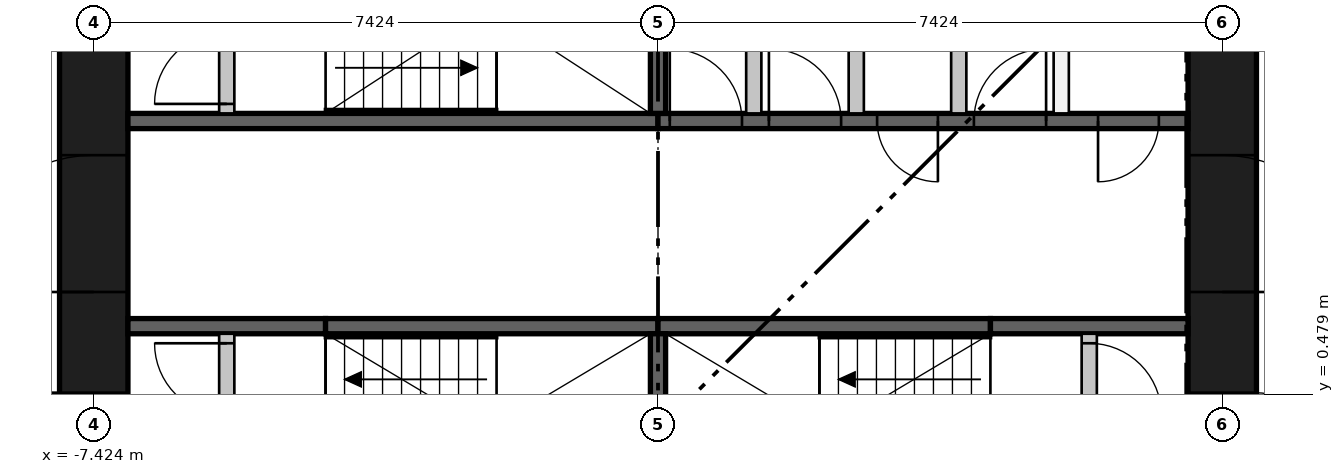
"""IFC4 building model, lengths in metres.
Left out: names, types, materials, properties, quantities, classifications, styles, units other than length and angle.
Written with IfcOpenShell. Run it as: python <this file> out.ifc"""

import sys

from ifc_helpers import new_model, si_unit, direction, frame, frame_2d, origin, place, context, subcontext, project, spatial, rectangle, extrude, element, fill, save


model = new_model("IFC4")
c1 = context("Model", 3, precision=1e-05, world=origin(), true_north=direction((0.0, 1.0)))
c2 = subcontext(c1, "Body", "Model", "MODEL_VIEW")
j1 = project(units=[si_unit("LENGTHUNIT", "METRE"), si_unit("PLANEANGLEUNIT", "RADIAN")], contexts=[c1])
p1 = place(None, origin())
s1 = spatial("IfcSite", under=j1, at=p1, CompositionType="ELEMENT")
p2 = place(p1, origin())
s2 = spatial("IfcBuilding", under=s1, at=p2, CompositionType="ELEMENT")
p3 = place(p2, frame((0.0, 0.0, 51.75)))
s3 = spatial("IfcBuildingStorey", under=s2, at=p3, CompositionType="ELEMENT", Elevation=51.75)
p4 = place(p3, frame((-7.424, -6.974, 0.0), z_axis=(0.0, 0.0, 1.0), x_axis=(0.0, 1.0, 0.0)))
e1 = element("IfcWall", 1, at=p4, inside=s3, PredefinedType="SHEAR", context=c2, shape_type="SweptSolid", body=[
    extrude(rectangle(XDim=13.948, YDim=0.9, at=frame_2d((6.974, 0.0))), origin(), (0.0, 0.0, 1.0), 3.65),
])
p5 = place(p4, frame((6.474, 0.0, 0.0)))
e2 = element("IfcOpeningElement", 2, at=p5, cuts=e1, PredefinedType="OPENING", context=c2, shape_type="SweptSolid", body=[
    extrude(rectangle(XDim=1.0, YDim=2.1, at=frame_2d((0.5, 1.05))), frame((0.0, 0.46, 0.0), z_axis=(0.0, -1.0, 0.0), x_axis=(1.0, 0.0, 0.0)), (0.0, 0.0, 1.0), 0.92),
])
p6 = place(p4, frame((3.35, 0.0, 0.0)))
e3 = element("IfcOpeningElement", 3, at=p6, cuts=e1, PredefinedType="OPENING", context=c2, shape_type="SweptSolid", body=[
    extrude(rectangle(XDim=1.8, YDim=2.1, at=frame_2d((0.9, 1.05))), frame((0.0, 0.46, 0.0), z_axis=(0.0, -1.0, 0.0), x_axis=(1.0, 0.0, 0.0)), (0.0, 0.0, 1.0), 0.92),
])
p7 = place(p4, frame((8.799, 0.0, 0.0)))
e4 = element("IfcOpeningElement", 4, at=p7, cuts=e1, PredefinedType="OPENING", context=c2, shape_type="SweptSolid", body=[
    extrude(rectangle(XDim=1.8, YDim=2.1, at=frame_2d((0.9, 1.05))), frame((0.0, 0.46, 0.0), z_axis=(0.0, -1.0, 0.0), x_axis=(1.0, 0.0, 0.0)), (0.0, 0.0, 1.0), 0.92),
])
p8 = place(p4, frame((11.974, 0.0, 0.0)))
e5 = element("IfcOpeningElement", 5, at=p8, cuts=e1, PredefinedType="OPENING", context=c2, shape_type="SweptSolid", body=[
    extrude(rectangle(XDim=1.0, YDim=2.1, at=frame_2d((0.5, 1.05))), frame((0.0, 0.46, 0.0), z_axis=(0.0, -1.0, 0.0), x_axis=(1.0, 0.0, 0.0)), (0.0, 0.0, 1.0), 0.92),
])
p9 = place(p3, frame((7.424, -6.974, 0.0), z_axis=(0.0, 0.0, 1.0), x_axis=(0.0, 1.0, 0.0)))
e6 = element("IfcWall", 6, at=p9, inside=s3, PredefinedType="SHEAR", context=c2, shape_type="SweptSolid", body=[
    extrude(rectangle(XDim=13.948, YDim=0.9, at=frame_2d((6.974, 0.0))), origin(), (0.0, 0.0, 1.0), 3.65),
])
p10 = place(p9, frame((6.474, 0.0, 0.0)))
e7 = element("IfcOpeningElement", 7, at=p10, cuts=e6, PredefinedType="OPENING", context=c2, shape_type="SweptSolid", body=[
    extrude(rectangle(XDim=1.0, YDim=2.1, at=frame_2d((0.5, 1.05))), frame((0.0, 0.46, 0.0), z_axis=(0.0, -1.0, 0.0), x_axis=(1.0, 0.0, 0.0)), (0.0, 0.0, 1.0), 0.92),
])
p11 = place(p9, frame((3.35, 0.0, 0.0)))
e8 = element("IfcOpeningElement", 8, at=p11, cuts=e6, PredefinedType="OPENING", context=c2, shape_type="SweptSolid", body=[
    extrude(rectangle(XDim=1.8, YDim=2.1, at=frame_2d((0.9, 1.05))), frame((0.0, 0.46, 0.0), z_axis=(0.0, -1.0, 0.0), x_axis=(1.0, 0.0, 0.0)), (0.0, 0.0, 1.0), 0.92),
])
p12 = place(p9, frame((8.799, 0.0, 0.0)))
e9 = element("IfcOpeningElement", 9, at=p12, cuts=e6, PredefinedType="OPENING", context=c2, shape_type="SweptSolid", body=[
    extrude(rectangle(XDim=1.8, YDim=2.1, at=frame_2d((0.9, 1.05))), frame((0.0, 0.46, 0.0), z_axis=(0.0, -1.0, 0.0), x_axis=(1.0, 0.0, 0.0)), (0.0, 0.0, 1.0), 0.92),
])
p13 = place(p3, frame((-6.974, 4.074, 0.0), z_axis=(0.0, 0.0, 1.0), x_axis=(1.0, 0.0, 0.0)))
e10 = element("IfcWall", 10, at=p13, inside=s3, PredefinedType="SHEAR", context=c2, shape_type="SweptSolid", body=[
    extrude(rectangle(XDim=6.974, YDim=0.2, at=frame_2d((3.487, 0.0))), origin(), (0.0, 0.0, 1.0), 3.3),
])
p14 = place(p3, frame((0.0, 4.074, 0.0), z_axis=(0.0, 0.0, 1.0), x_axis=(1.0, 0.0, 0.0)))
e11 = element("IfcWall", 11, at=p14, inside=s3, PredefinedType="SHEAR", context=c2, shape_type="SweptSolid", body=[
    extrude(rectangle(XDim=6.974, YDim=0.2, at=frame_2d((3.487, 0.0))), origin(), (0.0, 0.0, 1.0), 3.3),
])
p15 = place(p14, frame((0.155, 0.0, 0.0)))
e12 = element("IfcOpeningElement", 12, at=p15, cuts=e11, PredefinedType="OPENING", context=c2, shape_type="SweptSolid", body=[
    extrude(rectangle(XDim=0.95, YDim=2.1, at=frame_2d((0.475, 1.05))), frame((0.0, 0.11, 0.0), z_axis=(0.0, -1.0, 0.0), x_axis=(1.0, 0.0, 0.0)), (0.0, 0.0, 1.0), 0.22),
])
p16 = place(p14, frame((1.459, 0.0, 0.0)))
e13 = element("IfcOpeningElement", 13, at=p16, cuts=e11, PredefinedType="OPENING", context=c2, shape_type="SweptSolid", body=[
    extrude(rectangle(XDim=0.95, YDim=2.1, at=frame_2d((0.475, 1.05))), frame((0.0, 0.11, 0.0), z_axis=(0.0, -1.0, 0.0), x_axis=(1.0, 0.0, 0.0)), (0.0, 0.0, 1.0), 0.22),
])
p17 = place(p14, frame((2.883, 0.0, 0.0)))
e14 = element("IfcOpeningElement", 14, at=p17, cuts=e11, PredefinedType="OPENING", context=c2, shape_type="SweptSolid", body=[
    extrude(rectangle(XDim=0.8, YDim=2.1, at=frame_2d((0.4, 1.05))), frame((0.0, 0.11, 0.0), z_axis=(0.0, -1.0, 0.0), x_axis=(1.0, 0.0, 0.0)), (0.0, 0.0, 1.0), 0.22),
])
p18 = place(p14, frame((4.156, 0.0, 0.0)))
e15 = element("IfcOpeningElement", 15, at=p18, cuts=e11, PredefinedType="OPENING", context=c2, shape_type="SweptSolid", body=[
    extrude(rectangle(XDim=0.95, YDim=2.1, at=frame_2d((0.475, 1.05))), frame((0.0, 0.11, 0.0), z_axis=(0.0, -1.0, 0.0), x_axis=(1.0, 0.0, 0.0)), (0.0, 0.0, 1.0), 0.22),
])
p19 = place(p14, frame((5.79, 0.0, 0.0)))
e16 = element("IfcOpeningElement", 16, at=p19, cuts=e11, PredefinedType="OPENING", context=c2, shape_type="SweptSolid", body=[
    extrude(rectangle(XDim=0.8, YDim=2.1, at=frame_2d((0.4, 1.05))), frame((0.0, 0.11, 0.0), z_axis=(0.0, -1.0, 0.0), x_axis=(1.0, 0.0, 0.0)), (0.0, 0.0, 1.0), 0.22),
])
p20 = place(p3, frame((-6.974, 1.375, 0.0), z_axis=(0.0, 0.0, 1.0), x_axis=(1.0, 0.0, 0.0)))
e17 = element("IfcWall", 17, at=p20, inside=s3, PredefinedType="SHEAR", context=c2, shape_type="SweptSolid", body=[
    extrude(rectangle(XDim=2.6, YDim=0.2, at=frame_2d((1.3, 0.0))), origin(), (0.0, 0.0, 1.0), 3.3),
])
for number, where, z_axis, x_axis in (
    (18, (-4.374, 1.375, 0.0), (0.0, 0.0, 1.0), (1.0, 0.0, 0.0)),
    (19, (0.0, 1.375, 0.0), (0.0, 0.0, 1.0), (1.0, 0.0, 0.0)),
):
    element("IfcWall", number, at=place(p3, frame(where, z_axis=z_axis, x_axis=x_axis)), inside=s3, PredefinedType="SHEAR", context=c2, shape_type="SweptSolid", body=[
        extrude(rectangle(XDim=4.374, YDim=0.2, at=frame_2d((2.187, 0.0))), origin(), (0.0, 0.0, 1.0), 3.3),
    ])
p21 = place(p3, frame((4.374, 1.375, 0.0), z_axis=(0.0, 0.0, 1.0), x_axis=(1.0, 0.0, 0.0)))
e20 = element("IfcWall", 20, at=p21, inside=s3, PredefinedType="SHEAR", context=c2, shape_type="SweptSolid", body=[
    extrude(rectangle(XDim=2.6, YDim=0.2, at=frame_2d((1.3, 0.0))), origin(), (0.0, 0.0, 1.0), 3.3),
])
p22 = place(p3, frame((0.0, -1.275, 0.0), z_axis=(0.0, 0.0, 1.0), x_axis=(0.0, 1.0, 0.0)))
e21 = element("IfcWall", 21, at=p22, inside=s3, PredefinedType="SHEAR", context=c2, shape_type="SweptSolid", body=[
    extrude(rectangle(XDim=2.55, YDim=0.2, at=frame_2d((1.275, 0.0))), origin(), (0.0, 0.0, 1.0), 3.3),
])
p23 = place(p3, frame((0.0, 4.174, 0.0), z_axis=(0.0, 0.0, 1.0), x_axis=(0.0, 1.0, 0.0)))
e22 = element("IfcWall", 22, at=p23, inside=s3, PredefinedType="SHEAR", context=c2, shape_type="SweptSolid", body=[
    extrude(rectangle(XDim=1.4, YDim=0.2, at=frame_2d((0.7, 0.0))), origin(), (0.0, 0.0, 1.0), 3.3),
])
for number, where, z_axis, x_axis in (
    (23, (1.26, 4.174, 0.0), (0.0, 0.0, 1.0), (0.0, 1.0, 0.0)),
    (24, (2.609, 4.174, 0.0), (0.0, 0.0, 1.0), (0.0, 1.0, 0.0)),
    (25, (3.957, 4.174, 0.0), (0.0, 0.0, 1.0), (0.0, 1.0, 0.0)),
    (26, (5.305, 4.174, 0.0), (0.0, 0.0, 1.0), (0.0, 1.0, 0.0)),
):
    element("IfcWall", number, at=place(p3, frame(where, z_axis=z_axis, x_axis=x_axis)), inside=s3, PredefinedType="PARTITIONING", context=c2, shape_type="SweptSolid", body=[
        extrude(rectangle(XDim=2.8, YDim=0.2, at=frame_2d((1.4, 0.0))), origin(), (0.0, 0.0, 1.0), 3.3),
    ])
p24 = place(p3, frame((-5.674, -1.275, 0.0), z_axis=(0.0, 0.0, 1.0), x_axis=(0.0, 1.0, 0.0)))
e27 = element("IfcWall", 27, at=p24, inside=s3, PredefinedType="PARTITIONING", context=c2, shape_type="SweptSolid", body=[
    extrude(rectangle(XDim=2.55, YDim=0.2, at=frame_2d((1.275, 0.0))), origin(), (0.0, 0.0, 1.0), 3.3),
])
p25 = place(p24, frame((0.125, 0.0, 0.0)))
e28 = element("IfcOpeningElement", 28, at=p25, cuts=e27, PredefinedType="OPENING", context=c2, shape_type="SweptSolid", body=[
    extrude(rectangle(XDim=0.95, YDim=2.1, at=frame_2d((0.475, 1.05))), frame((0.0, 0.11, 0.0), z_axis=(0.0, -1.0, 0.0), x_axis=(1.0, 0.0, 0.0)), (0.0, 0.0, 1.0), 0.22),
])
p26 = place(p24, frame((1.475, 0.0, 0.0)))
e29 = element("IfcOpeningElement", 29, at=p26, cuts=e27, PredefinedType="OPENING", context=c2, shape_type="SweptSolid", body=[
    extrude(rectangle(XDim=0.95, YDim=2.1, at=frame_2d((0.475, 1.05))), frame((0.0, 0.11, 0.0), z_axis=(0.0, -1.0, 0.0), x_axis=(1.0, 0.0, 0.0)), (0.0, 0.0, 1.0), 0.22),
])
p27 = place(p3, frame((5.674, -1.275, 0.0), z_axis=(0.0, 0.0, 1.0), x_axis=(0.0, 1.0, 0.0)))
e30 = element("IfcWall", 30, at=p27, inside=s3, PredefinedType="PARTITIONING", context=c2, shape_type="SweptSolid", body=[
    extrude(rectangle(XDim=2.55, YDim=0.2, at=frame_2d((1.275, 0.0))), origin(), (0.0, 0.0, 1.0), 3.3),
])
p28 = place(p27, frame((0.125, 0.0, 0.0)))
e31 = element("IfcOpeningElement", 31, at=p28, cuts=e30, PredefinedType="OPENING", context=c2, shape_type="SweptSolid", body=[
    extrude(rectangle(XDim=0.95, YDim=2.1, at=frame_2d((0.475, 1.05))), frame((0.0, 0.11, 0.0), z_axis=(0.0, -1.0, 0.0), x_axis=(1.0, 0.0, 0.0)), (0.0, 0.0, 1.0), 0.22),
])
p29 = place(p27, frame((1.475, 0.0, 0.0)))
e32 = element("IfcOpeningElement", 32, at=p29, cuts=e30, PredefinedType="OPENING", context=c2, shape_type="SweptSolid", body=[
    extrude(rectangle(XDim=0.95, YDim=2.1, at=frame_2d((0.475, 1.05))), frame((0.0, 0.11, 0.0), z_axis=(0.0, -1.0, 0.0), x_axis=(1.0, 0.0, 0.0)), (0.0, 0.0, 1.0), 0.22),
])
p30 = place(p3, frame((-5.674, 4.174, 0.0), z_axis=(0.0, 0.0, 1.0), x_axis=(0.0, 1.0, 0.0)))
e33 = element("IfcWall", 33, at=p30, inside=s3, PredefinedType="PARTITIONING", context=c2, shape_type="SweptSolid", body=[
    extrude(rectangle(XDim=2.8, YDim=0.2, at=frame_2d((1.4, 0.0))), origin(), (0.0, 0.0, 1.0), 3.3),
])
p31 = place(p30, frame((0.125, 0.0, 0.0)))
e34 = element("IfcOpeningElement", 34, at=p31, cuts=e33, PredefinedType="OPENING", context=c2, shape_type="SweptSolid", body=[
    extrude(rectangle(XDim=0.95, YDim=2.1, at=frame_2d((0.475, 1.05))), frame((0.0, 0.11, 0.0), z_axis=(0.0, -1.0, 0.0), x_axis=(1.0, 0.0, 0.0)), (0.0, 0.0, 1.0), 0.22),
])
p32 = place(p30, frame((1.725, 0.0, 0.0)))
e35 = element("IfcOpeningElement", 35, at=p32, cuts=e33, PredefinedType="OPENING", context=c2, shape_type="SweptSolid", body=[
    extrude(rectangle(XDim=0.95, YDim=2.1, at=frame_2d((0.475, 1.05))), frame((0.0, 0.11, 0.0), z_axis=(0.0, -1.0, 0.0), x_axis=(1.0, 0.0, 0.0)), (0.0, 0.0, 1.0), 0.22),
])
p33 = place(p26, origin())
e36 = element("IfcDoor", 36, at=p33, inside=s3, OperationType="SINGLE_SWING_RIGHT", PredefinedType="DOOR", context=c2, shape_type="SweptSolid", body=[
    extrude(rectangle(XDim=0.95, YDim=2.1, at=frame_2d((0.475, 1.05))), frame((0.0, 0.025, 0.0), z_axis=(0.0, -1.0, 0.0), x_axis=(1.0, 0.0, 0.0)), (0.0, 0.0, 1.0), 0.05),
])
fill(e29, e36)
p34 = place(p29, frame((0.95, 0.0, 0.0), z_axis=(0.0, 0.0, 1.0), x_axis=(-1.0, 0.0, 0.0)))
e37 = element("IfcDoor", 37, at=p34, inside=s3, OperationType="SINGLE_SWING_LEFT", PredefinedType="DOOR", context=c2, shape_type="SweptSolid", body=[
    extrude(rectangle(XDim=0.95, YDim=2.1, at=frame_2d((0.475, 1.05))), frame((0.0, 0.025, 0.0), z_axis=(0.0, -1.0, 0.0), x_axis=(1.0, 0.0, 0.0)), (0.0, 0.0, 1.0), 0.05),
])
fill(e32, e37)
p35 = place(p31, origin())
e38 = element("IfcDoor", 38, at=p35, inside=s3, OperationType="SINGLE_SWING_LEFT", PredefinedType="DOOR", context=c2, shape_type="SweptSolid", body=[
    extrude(rectangle(XDim=0.95, YDim=2.1, at=frame_2d((0.475, 1.05))), frame((0.0, 0.025, 0.0), z_axis=(0.0, -1.0, 0.0), x_axis=(1.0, 0.0, 0.0)), (0.0, 0.0, 1.0), 0.05),
])
fill(e34, e38)
p36 = place(p15, origin())
e39 = element("IfcDoor", 39, at=p36, inside=s3, OperationType="SINGLE_SWING_LEFT", PredefinedType="DOOR", context=c2, shape_type="SweptSolid", body=[
    extrude(rectangle(XDim=0.95, YDim=2.1, at=frame_2d((0.475, 1.05))), frame((0.0, 0.025, 0.0), z_axis=(0.0, -1.0, 0.0), x_axis=(1.0, 0.0, 0.0)), (0.0, 0.0, 1.0), 0.05),
])
fill(e12, e39)
p37 = place(p16, origin())
e40 = element("IfcDoor", 40, at=p37, inside=s3, OperationType="SINGLE_SWING_LEFT", PredefinedType="DOOR", context=c2, shape_type="SweptSolid", body=[
    extrude(rectangle(XDim=0.95, YDim=2.1, at=frame_2d((0.475, 1.05))), frame((0.0, 0.025, 0.0), z_axis=(0.0, -1.0, 0.0), x_axis=(1.0, 0.0, 0.0)), (0.0, 0.0, 1.0), 0.05),
])
fill(e13, e40)
p38 = place(p17, frame((0.8, 0.0, 0.0), z_axis=(0.0, 0.0, 1.0), x_axis=(-1.0, 0.0, 0.0)))
e41 = element("IfcDoor", 41, at=p38, inside=s3, OperationType="SINGLE_SWING_RIGHT", PredefinedType="DOOR", context=c2, shape_type="SweptSolid", body=[
    extrude(rectangle(XDim=0.8, YDim=2.1, at=frame_2d((0.4, 1.05))), frame((0.0, 0.025, 0.0), z_axis=(0.0, -1.0, 0.0), x_axis=(1.0, 0.0, 0.0)), (0.0, 0.0, 1.0), 0.05),
])
fill(e14, e41)
p39 = place(p18, origin())
e42 = element("IfcDoor", 42, at=p39, inside=s3, OperationType="SINGLE_SWING_RIGHT", PredefinedType="DOOR", context=c2, shape_type="SweptSolid", body=[
    extrude(rectangle(XDim=0.95, YDim=2.1, at=frame_2d((0.475, 1.05))), frame((0.0, 0.025, 0.0), z_axis=(0.0, -1.0, 0.0), x_axis=(1.0, 0.0, 0.0)), (0.0, 0.0, 1.0), 0.05),
])
fill(e15, e42)
p40 = place(p19, frame((0.8, 0.0, 0.0), z_axis=(0.0, 0.0, 1.0), x_axis=(-1.0, 0.0, 0.0)))
e43 = element("IfcDoor", 43, at=p40, inside=s3, OperationType="SINGLE_SWING_LEFT", PredefinedType="DOOR", context=c2, shape_type="SweptSolid", body=[
    extrude(rectangle(XDim=0.8, YDim=2.1, at=frame_2d((0.4, 1.05))), frame((0.0, 0.025, 0.0), z_axis=(0.0, -1.0, 0.0), x_axis=(1.0, 0.0, 0.0)), (0.0, 0.0, 1.0), 0.05),
])
fill(e16, e43)
p41 = place(p5, origin())
e44 = element("IfcDoor", 44, at=p41, inside=s3, OperationType="SINGLE_SWING_RIGHT", PredefinedType="DOOR", context=c2, shape_type="SweptSolid", body=[
    extrude(rectangle(XDim=1.0, YDim=2.1, at=frame_2d((0.5, 1.05))), frame((0.0, 0.45, 0.0), z_axis=(0.0, -1.0, 0.0), x_axis=(1.0, 0.0, 0.0)), (0.0, 0.0, 1.0), 0.05),
])
fill(e2, e44)
p42 = place(p7, origin())
e45 = element("IfcDoor", 45, at=p42, inside=s3, OperationType="DOUBLE_DOOR_SINGLE_SWING", PredefinedType="DOOR", context=c2, shape_type="SweptSolid", body=[
    extrude(rectangle(XDim=1.8, YDim=2.1, at=frame_2d((0.9, 1.05))), frame((0.0, 0.025, 0.0), z_axis=(0.0, -1.0, 0.0), x_axis=(1.0, 0.0, 0.0)), (0.0, 0.0, 1.0), 0.05),
])
fill(e4, e45)
p43 = place(p10, frame((1.0, 0.0, 0.0), z_axis=(0.0, 0.0, 1.0), x_axis=(-1.0, 0.0, 0.0)))
e46 = element("IfcDoor", 46, at=p43, inside=s3, OperationType="SINGLE_SWING_LEFT", PredefinedType="DOOR", context=c2, shape_type="SweptSolid", body=[
    extrude(rectangle(XDim=1.0, YDim=2.1, at=frame_2d((0.5, 1.05))), frame((0.0, 0.45, 0.0), z_axis=(0.0, -1.0, 0.0), x_axis=(1.0, 0.0, 0.0)), (0.0, 0.0, 1.0), 0.05),
])
fill(e7, e46)
p44 = place(p12, frame((1.8, 0.0, 0.0), z_axis=(0.0, 0.0, 1.0), x_axis=(-1.0, 0.0, 0.0)))
e47 = element("IfcDoor", 47, at=p44, inside=s3, OperationType="DOUBLE_DOOR_SINGLE_SWING", PredefinedType="DOOR", context=c2, shape_type="SweptSolid", body=[
    extrude(rectangle(XDim=1.8, YDim=2.1, at=frame_2d((0.9, 1.05))), frame((0.0, 0.025, 0.0), z_axis=(0.0, -1.0, 0.0), x_axis=(1.0, 0.0, 0.0)), (0.0, 0.0, 1.0), 0.05),
])
fill(e9, e47)
save(model, sys.argv[1])
